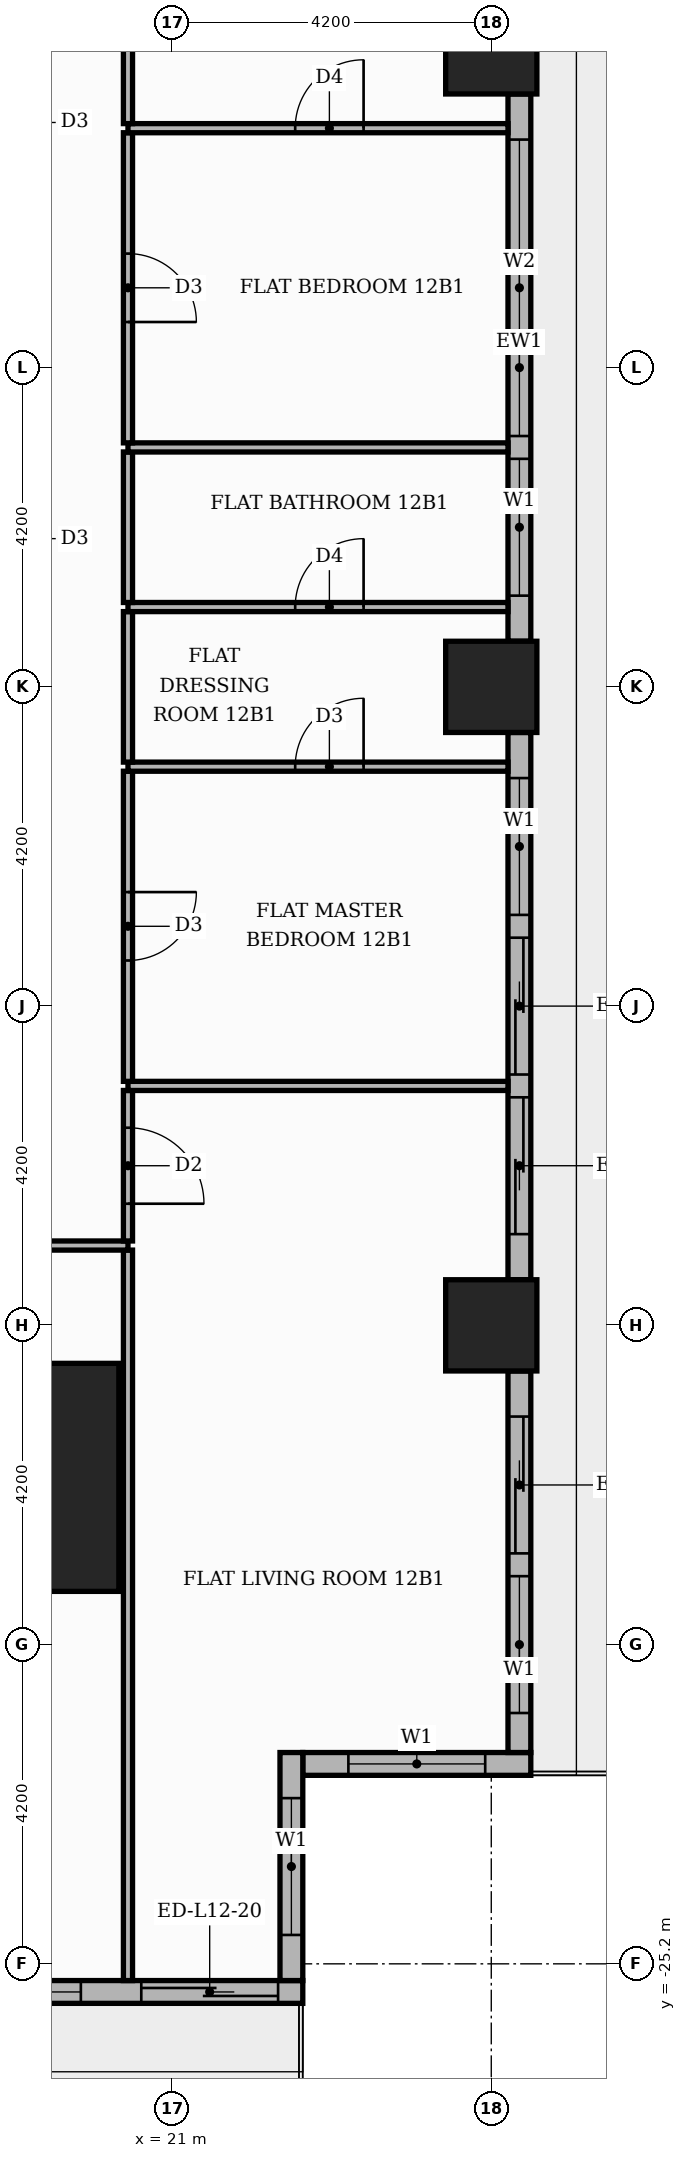
"""IFC4 building model, lengths in metres.
Left out: names, types, materials, properties, quantities, classifications, styles, units other than length and angle.
Written with IfcOpenShell. Run it as: python <this file> out.ifc"""

import sys

from ifc_helpers import new_model, si_unit, direction, frame, frame_2d, origin, origin_2d, place, context, subcontext, project, spatial, rectangle, extrude, element, fill, save


model = new_model("IFC4")
c1 = context("Model", 3, precision=1e-05, world=origin(), true_north=direction((0.0, 1.0)))
c2 = subcontext(c1, "Body", "Model", "MODEL_VIEW")
j1 = project(units=[si_unit("LENGTHUNIT", "METRE"), si_unit("PLANEANGLEUNIT", "RADIAN")], contexts=[c1])
p1 = place(None, origin())
s1 = spatial("IfcSite", under=j1, at=p1, CompositionType="ELEMENT")
p2 = place(p1, origin())
s2 = spatial("IfcBuilding", under=s1, at=p2, CompositionType="ELEMENT")
p3 = place(p2, frame((0.0, 0.0, 54.3)))
s3 = spatial("IfcBuildingStorey", under=s2, at=p3, CompositionType="ELEMENT", Elevation=54.3)
p4 = place(p3, frame((18.8, -18.8, 0.0), z_axis=(0.0, 0.0, 1.0), x_axis=(1.0, 0.0, 0.0)))
e1 = element("IfcColumn", 1, at=p4, inside=s3, PredefinedType="COLUMN", context=c2, shape_type="SweptSolid", body=[
    extrude(rectangle(XDim=3.0, YDim=3.0, at=origin_2d()), origin(), (0.0, 0.0, 1.0), 3.9),
])
for number, where, z_axis, x_axis in (
    (2, (25.2, 0.0, 0.0), (0.0, 0.0, 1.0), (1.0, 0.0, 0.0)),
    (3, (25.2, -8.4, 0.0), (0.0, 0.0, 1.0), (1.0, 0.0, 0.0)),
    (4, (25.2, -16.8, 0.0), (0.0, 0.0, 1.0), (1.0, 0.0, 0.0)),
):
    element("IfcColumn", number, at=place(p3, frame(where, z_axis=z_axis, x_axis=x_axis)), inside=s3, PredefinedType="COLUMN", context=c2, shape_type="SweptSolid", body=[
        extrude(rectangle(XDim=1.2, YDim=1.2, at=origin_2d()), origin(), (0.0, 0.0, 1.0), 3.9),
    ])
p5 = place(p3, frame((22.72, -22.57, 0.0), z_axis=(0.0, 0.0, 1.0), x_axis=(1.0, 0.0, 0.0)))
e5 = element("IfcWall", 5, at=p5, inside=s3, PredefinedType="STANDARD", context=c2, shape_type="SweptSolid", body=[
    extrude(rectangle(XDim=3.0, YDim=0.3, at=frame_2d((1.5, 0.0))), origin(), (0.0, 0.0, 1.0), 3.48),
])
p6 = place(p5, frame((0.6, 0.0, 0.9)))
e6 = element("IfcOpeningElement", 6, at=p6, cuts=e5, PredefinedType="OPENING", context=c2, shape_type="SweptSolid", body=[
    extrude(rectangle(XDim=1.8, YDim=2.1, at=frame_2d((0.9, 1.05))), frame((0.0, 0.16, 0.0), z_axis=(0.0, -1.0, 0.0), x_axis=(1.0, 0.0, 0.0)), (0.0, 0.0, 1.0), 0.32),
])
p7 = place(p3, frame((25.57, -22.42, 0.0), z_axis=(0.0, 0.0, 1.0), x_axis=(0.0, 1.0, 0.0)))
e7 = element("IfcWall", 7, at=p7, inside=s3, PredefinedType="STANDARD", context=c2, shape_type="SweptSolid", body=[
    extrude(rectangle(XDim=5.02, YDim=0.3, at=frame_2d((2.51, 0.0))), origin(), (0.0, 0.0, 1.0), 3.48),
])
p8 = place(p7, frame((0.52, 0.0, 0.9)))
e8 = element("IfcOpeningElement", 8, at=p8, cuts=e7, PredefinedType="OPENING", context=c2, shape_type="SweptSolid", body=[
    extrude(rectangle(XDim=1.8, YDim=2.1, at=frame_2d((0.9, 1.05))), frame((0.0, 0.16, 0.0), z_axis=(0.0, -1.0, 0.0), x_axis=(1.0, 0.0, 0.0)), (0.0, 0.0, 1.0), 0.32),
])
p9 = place(p7, frame((2.62, 0.0, 0.0)))
e9 = element("IfcOpeningElement", 9, at=p9, cuts=e7, PredefinedType="OPENING", context=c2, shape_type="SweptSolid", body=[
    extrude(rectangle(XDim=1.8, YDim=2.4, at=frame_2d((0.9, 1.2))), frame((0.0, 0.16, 0.0), z_axis=(0.0, -1.0, 0.0), x_axis=(1.0, 0.0, 0.0)), (0.0, 0.0, 1.0), 0.32),
])
p10 = place(p3, frame((25.57, -16.2, 0.0), z_axis=(0.0, 0.0, 1.0), x_axis=(0.0, 1.0, 0.0)))
e10 = element("IfcWall", 10, at=p10, inside=s3, PredefinedType="STANDARD", context=c2, shape_type="SweptSolid", body=[
    extrude(rectangle(XDim=7.2, YDim=0.3, at=frame_2d((3.6, 0.0))), origin(), (0.0, 0.0, 1.0), 3.48),
])
p11 = place(p10, frame((0.6, 0.0, 0.0)))
e11 = element("IfcOpeningElement", 11, at=p11, cuts=e10, PredefinedType="OPENING", context=c2, shape_type="SweptSolid", body=[
    extrude(rectangle(XDim=1.8, YDim=2.4, at=frame_2d((0.9, 1.2))), frame((0.0, 0.16, 0.0), z_axis=(0.0, -1.0, 0.0), x_axis=(1.0, 0.0, 0.0)), (0.0, 0.0, 1.0), 0.32),
])
p12 = place(p10, frame((2.7, 0.0, 0.0)))
e12 = element("IfcOpeningElement", 12, at=p12, cuts=e10, PredefinedType="OPENING", context=c2, shape_type="SweptSolid", body=[
    extrude(rectangle(XDim=1.8, YDim=2.4, at=frame_2d((0.9, 1.2))), frame((0.0, 0.16, 0.0), z_axis=(0.0, -1.0, 0.0), x_axis=(1.0, 0.0, 0.0)), (0.0, 0.0, 1.0), 0.32),
])
p13 = place(p10, frame((4.8, 0.0, 0.9)))
e13 = element("IfcOpeningElement", 13, at=p13, cuts=e10, PredefinedType="OPENING", context=c2, shape_type="SweptSolid", body=[
    extrude(rectangle(XDim=1.8, YDim=2.1, at=frame_2d((0.9, 1.05))), frame((0.0, 0.16, 0.0), z_axis=(0.0, -1.0, 0.0), x_axis=(1.0, 0.0, 0.0)), (0.0, 0.0, 1.0), 0.32),
])
p14 = place(p3, frame((25.57, -7.8, 0.0), z_axis=(0.0, 0.0, 1.0), x_axis=(0.0, 1.0, 0.0)))
e14 = element("IfcWall", 14, at=p14, inside=s3, PredefinedType="STANDARD", context=c2, shape_type="SweptSolid", body=[
    extrude(rectangle(XDim=7.2, YDim=0.3, at=frame_2d((3.6, 0.0))), origin(), (0.0, 0.0, 1.0), 3.48),
])
p15 = place(p14, frame((0.6, 0.0, 0.9)))
e15 = element("IfcOpeningElement", 15, at=p15, cuts=e14, PredefinedType="OPENING", context=c2, shape_type="SweptSolid", body=[
    extrude(rectangle(XDim=1.8, YDim=2.1, at=frame_2d((0.9, 1.05))), frame((0.0, 0.16, 0.0), z_axis=(0.0, -1.0, 0.0), x_axis=(1.0, 0.0, 0.0)), (0.0, 0.0, 1.0), 0.32),
])
p16 = place(p14, frame((2.7, 0.0, 0.9)))
e16 = element("IfcOpeningElement", 16, at=p16, cuts=e14, PredefinedType="OPENING", context=c2, shape_type="SweptSolid", body=[
    extrude(rectangle(XDim=3.9, YDim=2.1, at=frame_2d((1.95, 1.05))), frame((0.0, 0.16, 0.0), z_axis=(0.0, -1.0, 0.0), x_axis=(1.0, 0.0, 0.0)), (0.0, 0.0, 1.0), 0.32),
])
p17 = place(p3, frame((17.4, -25.57, 0.0), z_axis=(0.0, 0.0, 1.0), x_axis=(1.0, 0.0, 0.0)))
e17 = element("IfcWall", 17, at=p17, inside=s3, PredefinedType="STANDARD", context=c2, shape_type="SweptSolid", body=[
    extrude(rectangle(XDim=5.32, YDim=0.3, at=frame_2d((2.66, 0.0))), origin(), (0.0, 0.0, 1.0), 3.48),
])
p18 = place(p17, frame((0.6, 0.0, 0.9)))
e18 = element("IfcOpeningElement", 18, at=p18, cuts=e17, PredefinedType="OPENING", context=c2, shape_type="SweptSolid", body=[
    extrude(rectangle(XDim=1.8, YDim=2.1, at=frame_2d((0.9, 1.05))), frame((0.0, 0.16, 0.0), z_axis=(0.0, -1.0, 0.0), x_axis=(1.0, 0.0, 0.0)), (0.0, 0.0, 1.0), 0.32),
])
p19 = place(p17, frame((3.195, 0.0, 0.0)))
e19 = element("IfcOpeningElement", 19, at=p19, cuts=e17, PredefinedType="OPENING", context=c2, shape_type="SweptSolid", body=[
    extrude(rectangle(XDim=1.8, YDim=2.4, at=frame_2d((0.9, 1.2))), frame((0.0, 0.16, 0.0), z_axis=(0.0, -1.0, 0.0), x_axis=(1.0, 0.0, 0.0)), (0.0, 0.0, 1.0), 0.32),
])
p20 = place(p3, frame((22.57, -25.42, 0.0), z_axis=(0.0, 0.0, 1.0), x_axis=(0.0, 1.0, 0.0)))
e20 = element("IfcWall", 20, at=p20, inside=s3, PredefinedType="STANDARD", context=c2, shape_type="SweptSolid", body=[
    extrude(rectangle(XDim=3.0, YDim=0.3, at=frame_2d((1.5, 0.0))), origin(), (0.0, 0.0, 1.0), 3.48),
])
p21 = place(p20, frame((0.6, 0.0, 0.9)))
e21 = element("IfcOpeningElement", 21, at=p21, cuts=e20, PredefinedType="OPENING", context=c2, shape_type="SweptSolid", body=[
    extrude(rectangle(XDim=1.8, YDim=2.1, at=frame_2d((0.9, 1.05))), frame((0.0, 0.16, 0.0), z_axis=(0.0, -1.0, 0.0), x_axis=(1.0, 0.0, 0.0)), (0.0, 0.0, 1.0), 0.32),
])
p22 = place(p3, frame((20.42, -25.42, 0.0), z_axis=(0.0, 0.0, 1.0), x_axis=(0.0, 1.0, 0.0)))
e22 = element("IfcWall", 22, at=p22, inside=s3, PredefinedType="PARTITIONING", context=c2, shape_type="SweptSolid", body=[
    extrude(rectangle(XDim=9.61, YDim=0.12, at=frame_2d((4.805, 0.0))), origin(), (0.0, 0.0, 1.0), 3.48),
])
p23 = place(p3, frame((13.75, -15.75, 0.0), z_axis=(0.0, 0.0, 1.0), x_axis=(1.0, 0.0, 0.0)))
e23 = element("IfcWall", 23, at=p23, inside=s3, PredefinedType="PARTITIONING", context=c2, shape_type="SweptSolid", body=[
    extrude(rectangle(XDim=6.67, YDim=0.12, at=frame_2d((3.335, 0.0))), origin(), (0.0, 0.0, 1.0), 3.48),
])
p24 = place(p23, frame((2.785, 0.0, 0.0)))
e24 = element("IfcOpeningElement", 24, at=p24, cuts=e23, PredefinedType="OPENING", context=c2, shape_type="SweptSolid", body=[
    extrude(rectangle(XDim=1.0, YDim=2.1, at=frame_2d((0.5, 1.05))), frame((0.0, 0.07, 0.0), z_axis=(0.0, -1.0, 0.0), x_axis=(1.0, 0.0, 0.0)), (0.0, 0.0, 1.0), 0.14),
])
p25 = place(p3, frame((20.42, -15.69, 0.0), z_axis=(0.0, 0.0, 1.0), x_axis=(0.0, 1.0, 0.0)))
e25 = element("IfcWall", 25, at=p25, inside=s3, PredefinedType="PARTITIONING", context=c2, shape_type="SweptSolid", body=[
    extrude(rectangle(XDim=1.98, YDim=0.12, at=frame_2d((0.99, 0.0))), origin(), (0.0, 0.0, 1.0), 3.48),
])
p26 = place(p25, frame((0.49, 0.0, 0.0)))
e26 = element("IfcOpeningElement", 26, at=p26, cuts=e25, PredefinedType="OPENING", context=c2, shape_type="SweptSolid", body=[
    extrude(rectangle(XDim=1.0, YDim=2.1, at=frame_2d((0.5, 1.05))), frame((0.0, 0.07, 0.0), z_axis=(0.0, -1.0, 0.0), x_axis=(1.0, 0.0, 0.0)), (0.0, 0.0, 1.0), 0.14),
])
p27 = place(p3, frame((20.42, -13.65, 0.0), z_axis=(0.0, 0.0, 1.0), x_axis=(1.0, 0.0, 0.0)))
e27 = element("IfcWall", 27, at=p27, inside=s3, PredefinedType="PARTITIONING", context=c2, shape_type="SweptSolid", body=[
    extrude(rectangle(XDim=5.0, YDim=0.12, at=frame_2d((2.5, 0.0))), origin(), (0.0, 0.0, 1.0), 3.48),
])
p28 = place(p3, frame((20.42, -13.59, 0.0), z_axis=(0.0, 0.0, 1.0), x_axis=(0.0, 1.0, 0.0)))
e28 = element("IfcWall", 28, at=p28, inside=s3, PredefinedType="PARTITIONING", context=c2, shape_type="SweptSolid", body=[
    extrude(rectangle(XDim=4.08, YDim=0.12, at=frame_2d((2.04, 0.0))), origin(), (0.0, 0.0, 1.0), 3.48),
])
p29 = place(p28, frame((1.59, 0.0, 0.0)))
e29 = element("IfcOpeningElement", 29, at=p29, cuts=e28, PredefinedType="OPENING", context=c2, shape_type="SweptSolid", body=[
    extrude(rectangle(XDim=0.9, YDim=2.1, at=frame_2d((0.45, 1.05))), frame((0.0, 0.07, 0.0), z_axis=(0.0, -1.0, 0.0), x_axis=(1.0, 0.0, 0.0)), (0.0, 0.0, 1.0), 0.14),
])
p30 = place(p3, frame((20.42, -9.45, 0.0), z_axis=(0.0, 0.0, 1.0), x_axis=(1.0, 0.0, 0.0)))
e30 = element("IfcWall", 30, at=p30, inside=s3, PredefinedType="PARTITIONING", context=c2, shape_type="SweptSolid", body=[
    extrude(rectangle(XDim=5.0, YDim=0.12, at=frame_2d((2.5, 0.0))), origin(), (0.0, 0.0, 1.0), 3.48),
])
p31 = place(p30, frame((2.2, 0.0, 0.0)))
e31 = element("IfcOpeningElement", 31, at=p31, cuts=e30, PredefinedType="OPENING", context=c2, shape_type="SweptSolid", body=[
    extrude(rectangle(XDim=0.9, YDim=2.1, at=frame_2d((0.45, 1.05))), frame((0.0, 0.07, 0.0), z_axis=(0.0, -1.0, 0.0), x_axis=(1.0, 0.0, 0.0)), (0.0, 0.0, 1.0), 0.14),
])
p32 = place(p3, frame((20.42, -9.39, 0.0), z_axis=(0.0, 0.0, 1.0), x_axis=(0.0, 1.0, 0.0)))
e32 = element("IfcWall", 32, at=p32, inside=s3, PredefinedType="PARTITIONING", context=c2, shape_type="SweptSolid", body=[
    extrude(rectangle(XDim=1.98, YDim=0.12, at=frame_2d((0.99, 0.0))), origin(), (0.0, 0.0, 1.0), 3.48),
])
p33 = place(p3, frame((20.42, -7.35, 0.0), z_axis=(0.0, 0.0, 1.0), x_axis=(1.0, 0.0, 0.0)))
e33 = element("IfcWall", 33, at=p33, inside=s3, PredefinedType="PARTITIONING", context=c2, shape_type="SweptSolid", body=[
    extrude(rectangle(XDim=5.0, YDim=0.12, at=frame_2d((2.5, 0.0))), origin(), (0.0, 0.0, 1.0), 3.48),
])
p34 = place(p33, frame((2.2, 0.0, 0.0)))
e34 = element("IfcOpeningElement", 34, at=p34, cuts=e33, PredefinedType="OPENING", context=c2, shape_type="SweptSolid", body=[
    extrude(rectangle(XDim=0.9, YDim=2.1, at=frame_2d((0.45, 1.05))), frame((0.0, 0.07, 0.0), z_axis=(0.0, -1.0, 0.0), x_axis=(1.0, 0.0, 0.0)), (0.0, 0.0, 1.0), 0.14),
])
p35 = place(p3, frame((20.42, -7.29, 0.0), z_axis=(0.0, 0.0, 1.0), x_axis=(0.0, 1.0, 0.0)))
e35 = element("IfcWall", 35, at=p35, inside=s3, PredefinedType="PARTITIONING", context=c2, shape_type="SweptSolid", body=[
    extrude(rectangle(XDim=1.98, YDim=0.12, at=frame_2d((0.99, 0.0))), origin(), (0.0, 0.0, 1.0), 3.48),
])
p36 = place(p3, frame((20.42, -5.25, 0.0), z_axis=(0.0, 0.0, 1.0), x_axis=(1.0, 0.0, 0.0)))
e36 = element("IfcWall", 36, at=p36, inside=s3, PredefinedType="PARTITIONING", context=c2, shape_type="SweptSolid", body=[
    extrude(rectangle(XDim=5.0, YDim=0.12, at=frame_2d((2.5, 0.0))), origin(), (0.0, 0.0, 1.0), 3.48),
])
p37 = place(p3, frame((20.42, -5.19, 0.0), z_axis=(0.0, 0.0, 1.0), x_axis=(0.0, 1.0, 0.0)))
e37 = element("IfcWall", 37, at=p37, inside=s3, PredefinedType="PARTITIONING", context=c2, shape_type="SweptSolid", body=[
    extrude(rectangle(XDim=4.08, YDim=0.12, at=frame_2d((2.04, 0.0))), origin(), (0.0, 0.0, 1.0), 3.48),
])
p38 = place(p37, frame((1.59, 0.0, 0.0)))
e38 = element("IfcOpeningElement", 38, at=p38, cuts=e37, PredefinedType="OPENING", context=c2, shape_type="SweptSolid", body=[
    extrude(rectangle(XDim=0.9, YDim=2.1, at=frame_2d((0.45, 1.05))), frame((0.0, 0.07, 0.0), z_axis=(0.0, -1.0, 0.0), x_axis=(1.0, 0.0, 0.0)), (0.0, 0.0, 1.0), 0.14),
])
p39 = place(p3, frame((20.42, -1.05, 0.0), z_axis=(0.0, 0.0, 1.0), x_axis=(1.0, 0.0, 0.0)))
e39 = element("IfcWall", 39, at=p39, inside=s3, PredefinedType="PARTITIONING", context=c2, shape_type="SweptSolid", body=[
    extrude(rectangle(XDim=5.0, YDim=0.12, at=frame_2d((2.5, 0.0))), origin(), (0.0, 0.0, 1.0), 3.48),
])
p40 = place(p39, frame((2.2, 0.0, 0.0)))
e40 = element("IfcOpeningElement", 40, at=p40, cuts=e39, PredefinedType="OPENING", context=c2, shape_type="SweptSolid", body=[
    extrude(rectangle(XDim=0.9, YDim=2.1, at=frame_2d((0.45, 1.05))), frame((0.0, 0.07, 0.0), z_axis=(0.0, -1.0, 0.0), x_axis=(1.0, 0.0, 0.0)), (0.0, 0.0, 1.0), 0.14),
])
p41 = place(p3, frame((20.42, -0.99, 0.0), z_axis=(0.0, 0.0, 1.0), x_axis=(0.0, 1.0, 0.0)))
e41 = element("IfcWall", 41, at=p41, inside=s3, PredefinedType="PARTITIONING", context=c2, shape_type="SweptSolid", body=[
    extrude(rectangle(XDim=1.98, YDim=0.12, at=frame_2d((0.99, 0.0))), origin(), (0.0, 0.0, 1.0), 3.48),
])
p42 = place(p6, origin())
e42 = element("IfcWindow", 42, at=p42, inside=s3, PartitioningType="SINGLE_PANEL", PredefinedType="WINDOW", context=c2, shape_type="SweptSolid", body=[
    extrude(rectangle(XDim=1.8, YDim=2.1, at=frame_2d((0.9, 1.05))), frame((0.0, 0.03, 0.0), z_axis=(0.0, -1.0, 0.0), x_axis=(1.0, 0.0, 0.0)), (0.0, 0.0, 1.0), 0.06),
])
fill(e6, e42)
p43 = place(p8, origin())
e43 = element("IfcWindow", 43, at=p43, inside=s3, PartitioningType="SINGLE_PANEL", PredefinedType="WINDOW", context=c2, shape_type="SweptSolid", body=[
    extrude(rectangle(XDim=1.8, YDim=2.1, at=frame_2d((0.9, 1.05))), frame((0.0, 0.03, 0.0), z_axis=(0.0, -1.0, 0.0), x_axis=(1.0, 0.0, 0.0)), (0.0, 0.0, 1.0), 0.06),
])
fill(e8, e43)
p44 = place(p9, origin())
e44 = element("IfcDoor", 44, at=p44, inside=s3, OperationType="SLIDING_TO_RIGHT", PredefinedType="DOOR", context=c2, shape_type="SweptSolid", body=[
    extrude(rectangle(XDim=1.8, YDim=2.4, at=frame_2d((0.9, 1.2))), frame((0.0, 0.025, 0.0), z_axis=(0.0, -1.0, 0.0), x_axis=(1.0, 0.0, 0.0)), (0.0, 0.0, 1.0), 0.05),
])
fill(e9, e44)
p45 = place(p11, origin())
e45 = element("IfcDoor", 45, at=p45, inside=s3, OperationType="SLIDING_TO_LEFT", PredefinedType="DOOR", context=c2, shape_type="SweptSolid", body=[
    extrude(rectangle(XDim=1.8, YDim=2.4, at=frame_2d((0.9, 1.2))), frame((0.0, 0.025, 0.0), z_axis=(0.0, -1.0, 0.0), x_axis=(1.0, 0.0, 0.0)), (0.0, 0.0, 1.0), 0.05),
])
fill(e11, e45)
p46 = place(p12, origin())
e46 = element("IfcDoor", 46, at=p46, inside=s3, OperationType="SLIDING_TO_RIGHT", PredefinedType="DOOR", context=c2, shape_type="SweptSolid", body=[
    extrude(rectangle(XDim=1.8, YDim=2.4, at=frame_2d((0.9, 1.2))), frame((0.0, 0.025, 0.0), z_axis=(0.0, -1.0, 0.0), x_axis=(1.0, 0.0, 0.0)), (0.0, 0.0, 1.0), 0.05),
])
fill(e12, e46)
p47 = place(p13, origin())
e47 = element("IfcWindow", 47, at=p47, inside=s3, PartitioningType="SINGLE_PANEL", PredefinedType="WINDOW", context=c2, shape_type="SweptSolid", body=[
    extrude(rectangle(XDim=1.8, YDim=2.1, at=frame_2d((0.9, 1.05))), frame((0.0, 0.03, 0.0), z_axis=(0.0, -1.0, 0.0), x_axis=(1.0, 0.0, 0.0)), (0.0, 0.0, 1.0), 0.06),
])
fill(e13, e47)
p48 = place(p15, origin())
e48 = element("IfcWindow", 48, at=p48, inside=s3, PartitioningType="SINGLE_PANEL", PredefinedType="WINDOW", context=c2, shape_type="SweptSolid", body=[
    extrude(rectangle(XDim=1.8, YDim=2.1, at=frame_2d((0.9, 1.05))), frame((0.0, 0.03, 0.0), z_axis=(0.0, -1.0, 0.0), x_axis=(1.0, 0.0, 0.0)), (0.0, 0.0, 1.0), 0.06),
])
fill(e15, e48)
p49 = place(p16, origin())
e49 = element("IfcWindow", 49, at=p49, inside=s3, PartitioningType="SINGLE_PANEL", PredefinedType="WINDOW", context=c2, shape_type="SweptSolid", body=[
    extrude(rectangle(XDim=3.9, YDim=2.1, at=frame_2d((1.95, 1.05))), frame((0.0, 0.03, 0.0), z_axis=(0.0, -1.0, 0.0), x_axis=(1.0, 0.0, 0.0)), (0.0, 0.0, 1.0), 0.06),
])
fill(e16, e49)
p50 = place(p18, origin())
e50 = element("IfcWindow", 50, at=p50, inside=s3, PartitioningType="SINGLE_PANEL", PredefinedType="WINDOW", context=c2, shape_type="SweptSolid", body=[
    extrude(rectangle(XDim=1.8, YDim=2.1, at=frame_2d((0.9, 1.05))), frame((0.0, 0.03, 0.0), z_axis=(0.0, -1.0, 0.0), x_axis=(1.0, 0.0, 0.0)), (0.0, 0.0, 1.0), 0.06),
])
fill(e18, e50)
p51 = place(p19, origin())
e51 = element("IfcDoor", 51, at=p51, inside=s3, OperationType="SLIDING_TO_RIGHT", PredefinedType="DOOR", context=c2, shape_type="SweptSolid", body=[
    extrude(rectangle(XDim=1.8, YDim=2.4, at=frame_2d((0.9, 1.2))), frame((0.0, 0.025, 0.0), z_axis=(0.0, -1.0, 0.0), x_axis=(1.0, 0.0, 0.0)), (0.0, 0.0, 1.0), 0.05),
])
fill(e19, e51)
p52 = place(p21, origin())
e52 = element("IfcWindow", 52, at=p52, inside=s3, PartitioningType="SINGLE_PANEL", PredefinedType="WINDOW", context=c2, shape_type="SweptSolid", body=[
    extrude(rectangle(XDim=1.8, YDim=2.1, at=frame_2d((0.9, 1.05))), frame((0.0, 0.03, 0.0), z_axis=(0.0, -1.0, 0.0), x_axis=(1.0, 0.0, 0.0)), (0.0, 0.0, 1.0), 0.06),
])
fill(e21, e52)
p53 = place(p26, frame((1.0, 0.0, 0.0), z_axis=(0.0, 0.0, 1.0), x_axis=(-1.0, 0.0, 0.0)))
e53 = element("IfcDoor", 53, at=p53, inside=s3, OperationType="SINGLE_SWING_LEFT", PredefinedType="DOOR", context=c2, shape_type="SweptSolid", body=[
    extrude(rectangle(XDim=1.0, YDim=2.1, at=frame_2d((0.5, 1.05))), frame((0.0, 0.025, 0.0), z_axis=(0.0, -1.0, 0.0), x_axis=(1.0, 0.0, 0.0)), (0.0, 0.0, 1.0), 0.05),
])
fill(e26, e53)
p54 = place(p29, frame((0.9, 0.0, 0.0), z_axis=(0.0, 0.0, 1.0), x_axis=(-1.0, 0.0, 0.0)))
e54 = element("IfcDoor", 54, at=p54, inside=s3, OperationType="SINGLE_SWING_RIGHT", PredefinedType="DOOR", context=c2, shape_type="SweptSolid", body=[
    extrude(rectangle(XDim=0.9, YDim=2.1, at=frame_2d((0.45, 1.05))), frame((0.0, 0.025, 0.0), z_axis=(0.0, -1.0, 0.0), x_axis=(1.0, 0.0, 0.0)), (0.0, 0.0, 1.0), 0.05),
])
fill(e29, e54)
p55 = place(p31, origin())
e55 = element("IfcDoor", 55, at=p55, inside=s3, OperationType="SINGLE_SWING_RIGHT", PredefinedType="DOOR", context=c2, shape_type="SweptSolid", body=[
    extrude(rectangle(XDim=0.9, YDim=2.1, at=frame_2d((0.45, 1.05))), frame((0.0, 0.025, 0.0), z_axis=(0.0, -1.0, 0.0), x_axis=(1.0, 0.0, 0.0)), (0.0, 0.0, 1.0), 0.05),
])
fill(e31, e55)
p56 = place(p34, origin())
e56 = element("IfcDoor", 56, at=p56, inside=s3, OperationType="SINGLE_SWING_RIGHT", PredefinedType="DOOR", context=c2, shape_type="SweptSolid", body=[
    extrude(rectangle(XDim=0.9, YDim=2.1, at=frame_2d((0.45, 1.05))), frame((0.0, 0.025, 0.0), z_axis=(0.0, -1.0, 0.0), x_axis=(1.0, 0.0, 0.0)), (0.0, 0.0, 1.0), 0.05),
])
fill(e34, e56)
p57 = place(p38, frame((0.9, 0.0, 0.0), z_axis=(0.0, 0.0, 1.0), x_axis=(-1.0, 0.0, 0.0)))
e57 = element("IfcDoor", 57, at=p57, inside=s3, OperationType="SINGLE_SWING_LEFT", PredefinedType="DOOR", context=c2, shape_type="SweptSolid", body=[
    extrude(rectangle(XDim=0.9, YDim=2.1, at=frame_2d((0.45, 1.05))), frame((0.0, 0.025, 0.0), z_axis=(0.0, -1.0, 0.0), x_axis=(1.0, 0.0, 0.0)), (0.0, 0.0, 1.0), 0.05),
])
fill(e38, e57)
p58 = place(p40, origin())
e58 = element("IfcDoor", 58, at=p58, inside=s3, OperationType="SINGLE_SWING_RIGHT", PredefinedType="DOOR", context=c2, shape_type="SweptSolid", body=[
    extrude(rectangle(XDim=0.9, YDim=2.1, at=frame_2d((0.45, 1.05))), frame((0.0, 0.025, 0.0), z_axis=(0.0, -1.0, 0.0), x_axis=(1.0, 0.0, 0.0)), (0.0, 0.0, 1.0), 0.05),
])
fill(e40, e58)
save(model, sys.argv[1])
